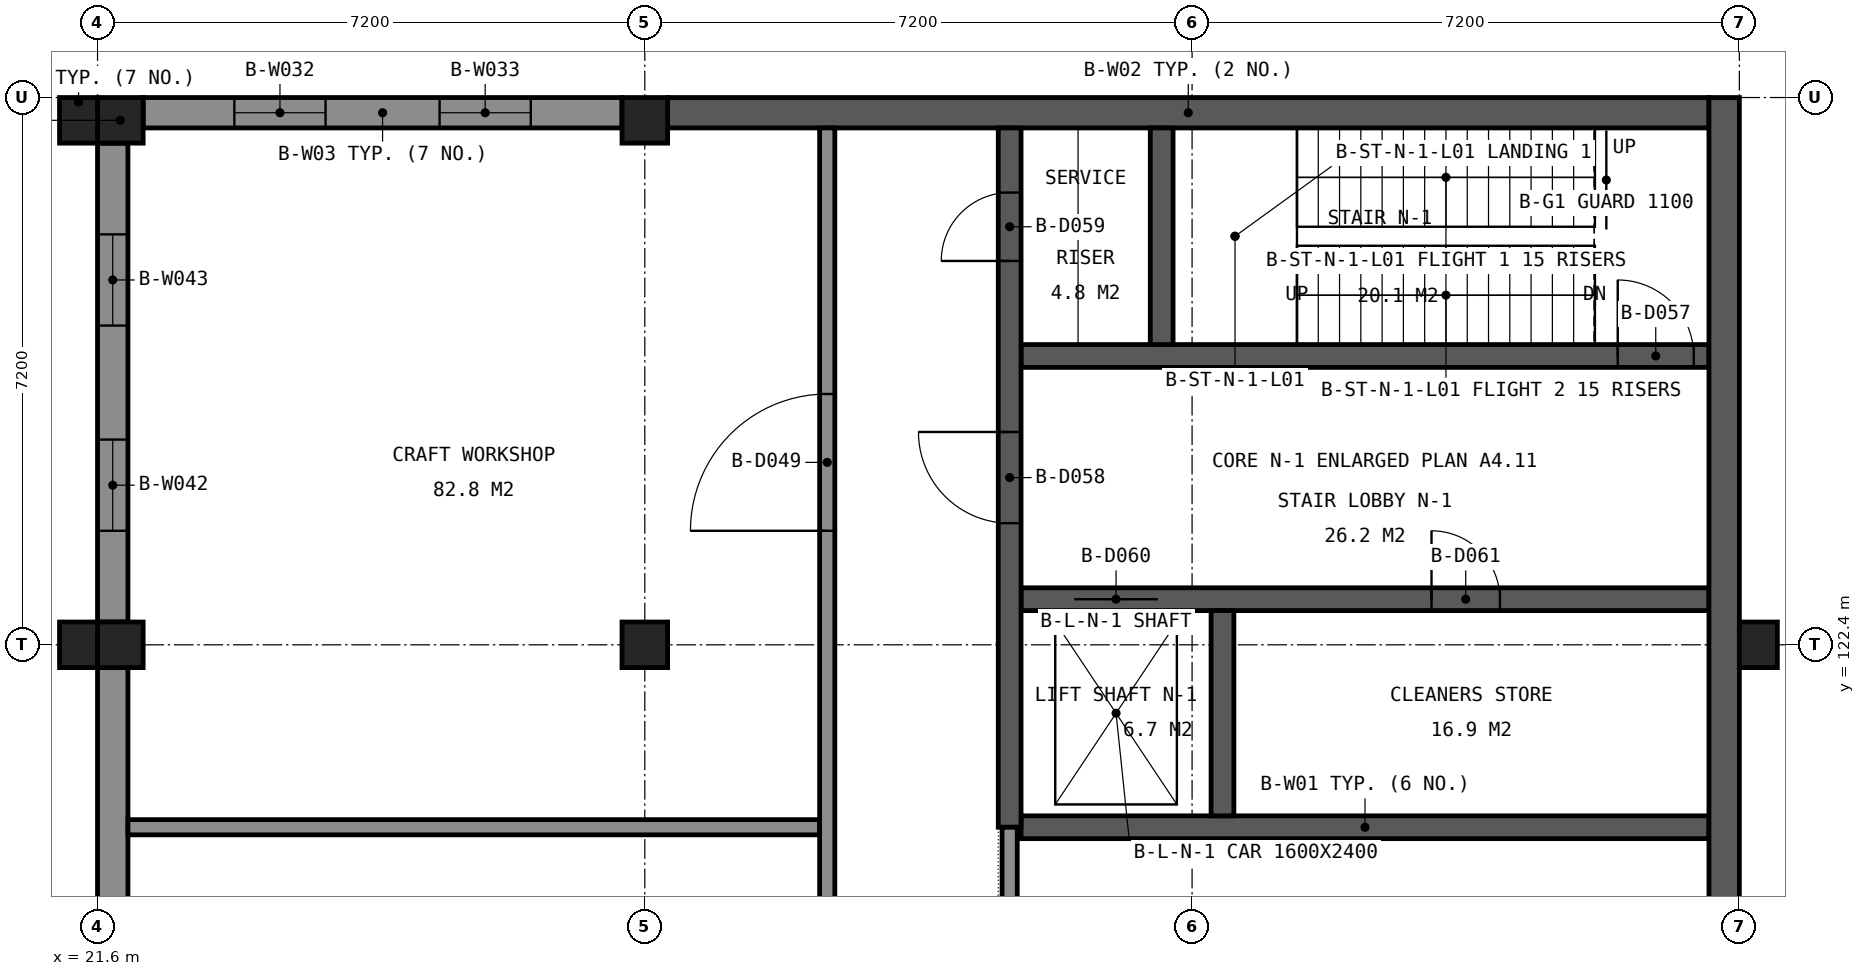
"""IFC4 building model, lengths in metres.
Left out: names, types, materials, properties, quantities, classifications, styles, units other than length and angle.
Written with IfcOpenShell. Run it as: python <this file> out.ifc"""

import sys

from ifc_helpers import new_model, si_unit, direction, frame, frame_2d, origin, origin_2d, place, context, subcontext, project, spatial, rectangle, extrude, element, fill, save


model = new_model("IFC4")
c1 = context("Model", 3, precision=1e-05, world=origin(), true_north=direction((0.0, 1.0)))
c2 = subcontext(c1, "Body", "Model", "MODEL_VIEW")
j1 = project(units=[si_unit("LENGTHUNIT", "METRE"), si_unit("PLANEANGLEUNIT", "RADIAN")], contexts=[c1])
p1 = place(None, origin())
s1 = spatial("IfcSite", under=j1, at=p1, CompositionType="ELEMENT")
p2 = place(p1, origin())
s2 = spatial("IfcBuilding", under=s1, at=p2, CompositionType="ELEMENT")
p3 = place(p2, frame((0.0, 0.0, 9.6)))
s3 = spatial("IfcBuildingStorey", under=s2, at=p3, CompositionType="ELEMENT", Elevation=9.6)
for number, where, z_axis, x_axis in (
    (1, (21.9, 129.3, 0.0), (0.0, 0.0, 1.0), (1.0, 0.0, 0.0)),
    (2, (21.9, 122.4, 0.0), (0.0, 0.0, 1.0), (1.0, 0.0, 0.0)),
    (3, (28.8, 129.3, 0.0), (0.0, 0.0, 1.0), (1.0, 0.0, 0.0)),
    (4, (28.8, 122.4, 0.0), (0.0, 0.0, 1.0), (1.0, 0.0, 0.0)),
):
    element("IfcColumn", number, at=place(p3, frame(where, z_axis=z_axis, x_axis=x_axis)), inside=s3, PredefinedType="COLUMN", context=c2, shape_type="SweptSolid", body=[
        extrude(rectangle(XDim=0.6, YDim=0.6, at=origin_2d()), origin(), (0.0, 0.0, 1.0), 4.8),
    ])
p4 = place(p3, frame((33.75, 120.0, 0.0), z_axis=(0.0, 0.0, 1.0), x_axis=(1.0, 0.0, 0.0)))
e5 = element("IfcWall", 5, at=p4, inside=s3, PredefinedType="SHEAR", context=c2, shape_type="SweptSolid", body=[
    extrude(rectangle(XDim=9.05, YDim=0.3, at=frame_2d((4.525, 0.0))), origin(), (0.0, 0.0, 1.0), 4.55),
])
p5 = place(p3, frame((33.75, 123.0, 0.0), z_axis=(0.0, 0.0, 1.0), x_axis=(1.0, 0.0, 0.0)))
e6 = element("IfcWall", 6, at=p5, inside=s3, PredefinedType="SHEAR", context=c2, shape_type="SweptSolid", body=[
    extrude(rectangle(XDim=9.05, YDim=0.3, at=frame_2d((4.525, 0.0))), origin(), (0.0, 0.0, 1.0), 4.55),
])
p6 = place(p5, frame((0.7, 0.0, 0.0)))
e7 = element("IfcOpeningElement", 7, at=p6, cuts=e6, PredefinedType="OPENING", context=c2, shape_type="SweptSolid", body=[
    extrude(rectangle(XDim=1.1, YDim=2.1, at=frame_2d((0.55, 1.05))), frame((0.0, 0.16, 0.0), z_axis=(0.0, -1.0, 0.0), x_axis=(1.0, 0.0, 0.0)), (0.0, 0.0, 1.0), 0.32),
])
p7 = place(p5, frame((5.4, 0.0, 0.0)))
e8 = element("IfcOpeningElement", 8, at=p7, cuts=e6, PredefinedType="OPENING", context=c2, shape_type="SweptSolid", body=[
    extrude(rectangle(XDim=0.9, YDim=2.1, at=frame_2d((0.45, 1.05))), frame((0.0, 0.16, 0.0), z_axis=(0.0, -1.0, 0.0), x_axis=(1.0, 0.0, 0.0)), (0.0, 0.0, 1.0), 0.32),
])
p8 = place(p3, frame((33.75, 126.2, 0.0), z_axis=(0.0, 0.0, 1.0), x_axis=(1.0, 0.0, 0.0)))
e9 = element("IfcWall", 9, at=p8, inside=s3, PredefinedType="SHEAR", context=c2, shape_type="SweptSolid", body=[
    extrude(rectangle(XDim=9.05, YDim=0.3, at=frame_2d((4.525, 0.0))), origin(), (0.0, 0.0, 1.0), 4.55),
])
p9 = place(p8, frame((7.85, 0.0, 0.0)))
e10 = element("IfcOpeningElement", 10, at=p9, cuts=e9, PredefinedType="OPENING", context=c2, shape_type="SweptSolid", body=[
    extrude(rectangle(XDim=1.0, YDim=2.1, at=frame_2d((0.5, 1.05))), frame((0.0, 0.16, 0.0), z_axis=(0.0, -1.0, 0.0), x_axis=(1.0, 0.0, 0.0)), (0.0, 0.0, 1.0), 0.32),
])
p10 = place(p3, frame((29.1, 129.4, 0.0), z_axis=(0.0, 0.0, 1.0), x_axis=(1.0, 0.0, 0.0)))
e11 = element("IfcWall", 11, at=p10, inside=s3, PredefinedType="SHEAR", context=c2, shape_type="SweptSolid", body=[
    extrude(rectangle(XDim=13.7, YDim=0.4, at=frame_2d((6.85, 0.0))), origin(), (0.0, 0.0, 1.0), 4.55),
])
p11 = place(p3, frame((33.6, 120.0, 0.0), z_axis=(0.0, 0.0, 1.0), x_axis=(0.0, 1.0, 0.0)))
e12 = element("IfcWall", 12, at=p11, inside=s3, PredefinedType="SHEAR", context=c2, shape_type="SweptSolid", body=[
    extrude(rectangle(XDim=9.2, YDim=0.3, at=frame_2d((4.6, 0.0))), origin(), (0.0, 0.0, 1.0), 4.55),
])
p12 = place(p11, frame((4.0, 0.0, 0.0)))
e13 = element("IfcOpeningElement", 13, at=p12, cuts=e12, PredefinedType="OPENING", context=c2, shape_type="SweptSolid", body=[
    extrude(rectangle(XDim=1.2, YDim=2.1, at=frame_2d((0.6, 1.05))), frame((0.0, 0.16, 0.0), z_axis=(0.0, -1.0, 0.0), x_axis=(1.0, 0.0, 0.0)), (0.0, 0.0, 1.0), 0.32),
])
p13 = place(p11, frame((7.45, 0.0, 0.0)))
e14 = element("IfcOpeningElement", 14, at=p13, cuts=e12, PredefinedType="OPENING", context=c2, shape_type="SweptSolid", body=[
    extrude(rectangle(XDim=0.9, YDim=2.1, at=frame_2d((0.45, 1.05))), frame((0.0, 0.16, 0.0), z_axis=(0.0, -1.0, 0.0), x_axis=(1.0, 0.0, 0.0)), (0.0, 0.0, 1.0), 0.32),
])
p14 = place(p3, frame((35.6, 126.35, 0.0), z_axis=(0.0, 0.0, 1.0), x_axis=(0.0, 1.0, 0.0)))
e15 = element("IfcWall", 15, at=p14, inside=s3, PredefinedType="SHEAR", context=c2, shape_type="SweptSolid", body=[
    extrude(rectangle(XDim=2.85, YDim=0.3, at=frame_2d((1.425, 0.0))), origin(), (0.0, 0.0, 1.0), 4.55),
])
p15 = place(p3, frame((36.4, 120.15, 0.0), z_axis=(0.0, 0.0, 1.0), x_axis=(0.0, 1.0, 0.0)))
e16 = element("IfcWall", 16, at=p15, inside=s3, PredefinedType="SHEAR", context=c2, shape_type="SweptSolid", body=[
    extrude(rectangle(XDim=2.7, YDim=0.3, at=frame_2d((1.35, 0.0))), origin(), (0.0, 0.0, 1.0), 4.55),
])
p16 = place(p3, frame((43.0, 115.5, 0.0), z_axis=(0.0, 0.0, 1.0), x_axis=(0.0, 1.0, 0.0)))
e17 = element("IfcWall", 17, at=p16, inside=s3, PredefinedType="SHEAR", context=c2, shape_type="SweptSolid", body=[
    extrude(rectangle(XDim=14.1, YDim=0.4, at=frame_2d((7.05, 0.0))), origin(), (0.0, 0.0, 1.0), 4.55),
])
p17 = place(p3, frame((22.2, 129.4, 0.0), z_axis=(0.0, 0.0, 1.0), x_axis=(1.0, 0.0, 0.0)))
e18 = element("IfcWall", 18, at=p17, inside=s3, PredefinedType="SOLIDWALL", context=c2, shape_type="SweptSolid", body=[
    extrude(rectangle(XDim=6.3, YDim=0.4, at=frame_2d((3.15, 0.0))), origin(), (0.0, 0.0, 1.0), 3.95),
])
p18 = place(p17, frame((1.2, 0.0, 0.9)))
e19 = element("IfcOpeningElement", 19, at=p18, cuts=e18, PredefinedType="OPENING", context=c2, shape_type="SweptSolid", body=[
    extrude(rectangle(XDim=1.2, YDim=2.4, at=frame_2d((0.6, 1.2))), frame((0.0, 0.21, 0.0), z_axis=(0.0, -1.0, 0.0), x_axis=(1.0, 0.0, 0.0)), (0.0, 0.0, 1.0), 0.42),
])
p19 = place(p17, frame((3.9, 0.0, 0.9)))
e20 = element("IfcOpeningElement", 20, at=p19, cuts=e18, PredefinedType="OPENING", context=c2, shape_type="SweptSolid", body=[
    extrude(rectangle(XDim=1.2, YDim=2.4, at=frame_2d((0.6, 1.2))), frame((0.0, 0.21, 0.0), z_axis=(0.0, -1.0, 0.0), x_axis=(1.0, 0.0, 0.0)), (0.0, 0.0, 1.0), 0.42),
])
p20 = place(p3, frame((21.8, 115.5, 0.0), z_axis=(0.0, 0.0, 1.0), x_axis=(0.0, 1.0, 0.0)))
e21 = element("IfcWall", 21, at=p20, inside=s3, PredefinedType="SOLIDWALL", context=c2, shape_type="SweptSolid", body=[
    extrude(rectangle(XDim=6.6, YDim=0.4, at=frame_2d((3.3, 0.0))), origin(), (0.0, 0.0, 1.0), 3.95),
])
p21 = place(p20, frame((1.575, 0.0, 0.9)))
e22 = element("IfcOpeningElement", 22, at=p21, cuts=e21, PredefinedType="OPENING", context=c2, shape_type="SweptSolid", body=[
    extrude(rectangle(XDim=1.2, YDim=2.4, at=frame_2d((0.6, 1.2))), frame((0.0, 0.21, 0.0), z_axis=(0.0, -1.0, 0.0), x_axis=(1.0, 0.0, 0.0)), (0.0, 0.0, 1.0), 0.42),
])
p22 = place(p3, frame((21.8, 122.7, 0.0), z_axis=(0.0, 0.0, 1.0), x_axis=(0.0, 1.0, 0.0)))
e23 = element("IfcWall", 23, at=p22, inside=s3, PredefinedType="SOLIDWALL", context=c2, shape_type="SweptSolid", body=[
    extrude(rectangle(XDim=6.3, YDim=0.4, at=frame_2d((3.15, 0.0))), origin(), (0.0, 0.0, 1.0), 3.95),
])
p23 = place(p22, frame((1.2, 0.0, 0.9)))
e24 = element("IfcOpeningElement", 24, at=p23, cuts=e23, PredefinedType="OPENING", context=c2, shape_type="SweptSolid", body=[
    extrude(rectangle(XDim=1.2, YDim=2.4, at=frame_2d((0.6, 1.2))), frame((0.0, 0.21, 0.0), z_axis=(0.0, -1.0, 0.0), x_axis=(1.0, 0.0, 0.0)), (0.0, 0.0, 1.0), 0.42),
])
p24 = place(p22, frame((3.9, 0.0, 0.9)))
e25 = element("IfcOpeningElement", 25, at=p24, cuts=e23, PredefinedType="OPENING", context=c2, shape_type="SweptSolid", body=[
    extrude(rectangle(XDim=1.2, YDim=2.4, at=frame_2d((0.6, 1.2))), frame((0.0, 0.21, 0.0), z_axis=(0.0, -1.0, 0.0), x_axis=(1.0, 0.0, 0.0)), (0.0, 0.0, 1.0), 0.42),
])
for number, where, z_axis, x_axis in (
    (26, (21.35, 122.4, 0.0), (0.0, 0.0, 1.0), (1.0, 0.0, 0.0)),
    (27, (21.35, 129.3, 0.0), (0.0, 0.0, 1.0), (1.0, 0.0, 0.0)),
):
    element("IfcColumn", number, at=place(p3, frame(where, z_axis=z_axis, x_axis=x_axis)), inside=s3, PredefinedType="COLUMN", context=c2, shape_type="SweptSolid", body=[
        extrude(rectangle(XDim=0.5, YDim=0.6, at=origin_2d()), origin(), (0.0, 0.0, 1.0), 4.8),
    ])
p25 = place(p3, frame((21.525, 115.5, -0.15), z_axis=(0.0, 0.0, 1.0), x_axis=(0.0, 1.0, 0.0)))
e28 = element("IfcWall", 28, at=p25, inside=s3, PredefinedType="SOLIDWALL", context=c2, shape_type="SweptSolid", body=[
    extrude(rectangle(XDim=6.6, YDim=0.15, at=frame_2d((3.3, 0.0))), origin(), (0.0, 0.0, 1.0), 0.3),
])
p26 = place(p3, frame((21.525, 122.7, -0.15), z_axis=(0.0, 0.0, 1.0), x_axis=(0.0, 1.0, 0.0)))
e29 = element("IfcWall", 29, at=p26, inside=s3, PredefinedType="SOLIDWALL", context=c2, shape_type="SweptSolid", body=[
    extrude(rectangle(XDim=6.3, YDim=0.15, at=frame_2d((3.15, 0.0))), origin(), (0.0, 0.0, 1.0), 0.3),
])
p27 = place(p3, frame((43.45, 122.4, 0.0), z_axis=(0.0, 0.0, 1.0), x_axis=(1.0, 0.0, 0.0)))
e30 = element("IfcColumn", 30, at=p27, inside=s3, PredefinedType="COLUMN", context=c2, shape_type="SweptSolid", body=[
    extrude(rectangle(XDim=0.5, YDim=0.6, at=origin_2d()), origin(), (0.0, 0.0, 1.0), 4.8),
])
p28 = place(p3, frame((43.275, 115.5, -0.15), z_axis=(0.0, 0.0, 1.0), x_axis=(0.0, 1.0, 0.0)))
e31 = element("IfcWall", 31, at=p28, inside=s3, PredefinedType="SOLIDWALL", context=c2, shape_type="SweptSolid", body=[
    extrude(rectangle(XDim=6.6, YDim=0.15, at=frame_2d((3.3, 0.0))), origin(), (0.0, 0.0, 1.0), 0.3),
])
p29 = place(p3, frame((43.275, 122.7, -0.15), z_axis=(0.0, 0.0, 1.0), x_axis=(0.0, 1.0, 0.0)))
e32 = element("IfcWall", 32, at=p29, inside=s3, PredefinedType="SOLIDWALL", context=c2, shape_type="SweptSolid", body=[
    extrude(rectangle(XDim=6.9, YDim=0.15, at=frame_2d((3.45, 0.0))), origin(), (0.0, 0.0, 1.0), 0.3),
])
p30 = place(p3, frame((22.0, 120.0, 0.0), z_axis=(0.0, 0.0, 1.0), x_axis=(1.0, 0.0, 0.0)))
e33 = element("IfcWall", 33, at=p30, inside=s3, PredefinedType="PARTITIONING", context=c2, shape_type="SweptSolid", body=[
    extrude(rectangle(XDim=9.1, YDim=0.2, at=frame_2d((4.55, 0.0))), origin(), (0.0, 0.0, 1.0), 3.95),
])
p31 = place(p3, frame((31.2, 86.8, 0.0), z_axis=(0.0, 0.0, 1.0), x_axis=(0.0, 1.0, 0.0)))
e34 = element("IfcWall", 34, at=p31, inside=s3, PredefinedType="PARTITIONING", context=c2, shape_type="SweptSolid", body=[
    extrude(rectangle(XDim=42.4, YDim=0.2, at=frame_2d((21.2, 0.0))), origin(), (0.0, 0.0, 1.0), 3.95),
])
p32 = place(p31, frame((37.1, 0.0, 0.0)))
e35 = element("IfcOpeningElement", 35, at=p32, cuts=e34, PredefinedType="OPENING", context=c2, shape_type="SweptSolid", body=[
    extrude(rectangle(XDim=1.8, YDim=2.1, at=frame_2d((0.9, 1.05))), frame((0.0, 0.11, 0.0), z_axis=(0.0, -1.0, 0.0), x_axis=(1.0, 0.0, 0.0)), (0.0, 0.0, 1.0), 0.22),
])
p33 = place(p31, frame((27.5, 0.0, 0.0)))
e36 = element("IfcOpeningElement", 36, at=p33, cuts=e34, PredefinedType="OPENING", context=c2, shape_type="SweptSolid", body=[
    extrude(rectangle(XDim=1.8, YDim=2.1, at=frame_2d((0.9, 1.05))), frame((0.0, 0.11, 0.0), z_axis=(0.0, -1.0, 0.0), x_axis=(1.0, 0.0, 0.0)), (0.0, 0.0, 1.0), 0.22),
])
p34 = place(p31, frame((17.9, 0.0, 0.0)))
e37 = element("IfcOpeningElement", 37, at=p34, cuts=e34, PredefinedType="OPENING", context=c2, shape_type="SweptSolid", body=[
    extrude(rectangle(XDim=1.8, YDim=2.1, at=frame_2d((0.9, 1.05))), frame((0.0, 0.11, 0.0), z_axis=(0.0, -1.0, 0.0), x_axis=(1.0, 0.0, 0.0)), (0.0, 0.0, 1.0), 0.22),
])
p35 = place(p31, frame((9.9, 0.0, 0.0)))
e38 = element("IfcOpeningElement", 38, at=p35, cuts=e34, PredefinedType="OPENING", context=c2, shape_type="SweptSolid", body=[
    extrude(rectangle(XDim=1.0, YDim=2.1, at=frame_2d((0.5, 1.05))), frame((0.0, 0.11, 0.0), z_axis=(0.0, -1.0, 0.0), x_axis=(1.0, 0.0, 0.0)), (0.0, 0.0, 1.0), 0.22),
])
p36 = place(p31, frame((2.7, 0.0, 0.0)))
e39 = element("IfcOpeningElement", 39, at=p36, cuts=e34, PredefinedType="OPENING", context=c2, shape_type="SweptSolid", body=[
    extrude(rectangle(XDim=1.0, YDim=2.1, at=frame_2d((0.5, 1.05))), frame((0.0, 0.11, 0.0), z_axis=(0.0, -1.0, 0.0), x_axis=(1.0, 0.0, 0.0)), (0.0, 0.0, 1.0), 0.22),
])
p37 = place(p3, frame((33.6, 96.0, 0.0), z_axis=(0.0, 0.0, 1.0), x_axis=(0.0, 1.0, 0.0)))
e40 = element("IfcWall", 40, at=p37, inside=s3, PredefinedType="PARTITIONING", context=c2, shape_type="SweptSolid", body=[
    extrude(rectangle(XDim=24.0, YDim=0.2, at=frame_2d((12.0, 0.0))), origin(), (0.0, 0.0, 1.0), 3.95),
])
p38 = place(p37, frame((17.1, 0.0, 0.0)))
e41 = element("IfcOpeningElement", 41, at=p38, cuts=e40, PredefinedType="OPENING", context=c2, shape_type="SweptSolid", body=[
    extrude(rectangle(XDim=1.8, YDim=2.1, at=frame_2d((0.9, 1.05))), frame((0.0, 0.11, 0.0), z_axis=(0.0, -1.0, 0.0), x_axis=(1.0, 0.0, 0.0)), (0.0, 0.0, 1.0), 0.22),
])
p39 = place(p37, frame((7.9, 0.0, 0.0)))
e42 = element("IfcOpeningElement", 42, at=p39, cuts=e40, PredefinedType="OPENING", context=c2, shape_type="SweptSolid", body=[
    extrude(rectangle(XDim=1.0, YDim=2.1, at=frame_2d((0.5, 1.05))), frame((0.0, 0.11, 0.0), z_axis=(0.0, -1.0, 0.0), x_axis=(1.0, 0.0, 0.0)), (0.0, 0.0, 1.0), 0.22),
])
p40 = place(p37, frame((1.9, 0.0, 0.0)))
e43 = element("IfcOpeningElement", 43, at=p40, cuts=e40, PredefinedType="OPENING", context=c2, shape_type="SweptSolid", body=[
    extrude(rectangle(XDim=1.0, YDim=2.1, at=frame_2d((0.5, 1.05))), frame((0.0, 0.11, 0.0), z_axis=(0.0, -1.0, 0.0), x_axis=(1.0, 0.0, 0.0)), (0.0, 0.0, 1.0), 0.22),
])
p41 = place(p18, origin())
e44 = element("IfcWindow", 44, at=p41, inside=s3, PartitioningType="SINGLE_PANEL", PredefinedType="WINDOW", context=c2, shape_type="SweptSolid", body=[
    extrude(rectangle(XDim=1.2, YDim=2.4, at=frame_2d((0.6, 1.2))), frame((0.0, 0.03, 0.0), z_axis=(0.0, -1.0, 0.0), x_axis=(1.0, 0.0, 0.0)), (0.0, 0.0, 1.0), 0.06),
])
fill(e19, e44)
p42 = place(p19, origin())
e45 = element("IfcWindow", 45, at=p42, inside=s3, PartitioningType="SINGLE_PANEL", PredefinedType="WINDOW", context=c2, shape_type="SweptSolid", body=[
    extrude(rectangle(XDim=1.2, YDim=2.4, at=frame_2d((0.6, 1.2))), frame((0.0, 0.03, 0.0), z_axis=(0.0, -1.0, 0.0), x_axis=(1.0, 0.0, 0.0)), (0.0, 0.0, 1.0), 0.06),
])
fill(e20, e45)
p43 = place(p23, origin())
e46 = element("IfcWindow", 46, at=p43, inside=s3, PartitioningType="SINGLE_PANEL", PredefinedType="WINDOW", context=c2, shape_type="SweptSolid", body=[
    extrude(rectangle(XDim=1.2, YDim=2.4, at=frame_2d((0.6, 1.2))), frame((0.0, 0.03, 0.0), z_axis=(0.0, -1.0, 0.0), x_axis=(1.0, 0.0, 0.0)), (0.0, 0.0, 1.0), 0.06),
])
fill(e24, e46)
p44 = place(p24, origin())
e47 = element("IfcWindow", 47, at=p44, inside=s3, PartitioningType="SINGLE_PANEL", PredefinedType="WINDOW", context=c2, shape_type="SweptSolid", body=[
    extrude(rectangle(XDim=1.2, YDim=2.4, at=frame_2d((0.6, 1.2))), frame((0.0, 0.03, 0.0), z_axis=(0.0, -1.0, 0.0), x_axis=(1.0, 0.0, 0.0)), (0.0, 0.0, 1.0), 0.06),
])
fill(e25, e47)
p45 = place(p32, origin())
e48 = element("IfcDoor", 48, at=p45, inside=s3, OperationType="DOUBLE_DOOR_DOUBLE_SWING", PredefinedType="DOOR", context=c2, shape_type="SweptSolid", body=[
    extrude(rectangle(XDim=1.8, YDim=2.1, at=frame_2d((0.9, 1.05))), frame((0.0, 0.025, 0.0), z_axis=(0.0, -1.0, 0.0), x_axis=(1.0, 0.0, 0.0)), (0.0, 0.0, 1.0), 0.05),
])
fill(e35, e48)
p46 = place(p9, origin())
e49 = element("IfcDoor", 49, at=p46, inside=s3, OperationType="SINGLE_SWING_LEFT", PredefinedType="DOOR", context=c2, shape_type="SweptSolid", body=[
    extrude(rectangle(XDim=1.0, YDim=2.1, at=frame_2d((0.5, 1.05))), frame((0.0, 0.025, 0.0), z_axis=(0.0, -1.0, 0.0), x_axis=(1.0, 0.0, 0.0)), (0.0, 0.0, 1.0), 0.05),
])
fill(e10, e49)
p47 = place(p12, origin())
e50 = element("IfcDoor", 50, at=p47, inside=s3, OperationType="SINGLE_SWING_RIGHT", PredefinedType="DOOR", context=c2, shape_type="SweptSolid", body=[
    extrude(rectangle(XDim=1.2, YDim=2.1, at=frame_2d((0.6, 1.05))), frame((0.0, 0.025, 0.0), z_axis=(0.0, -1.0, 0.0), x_axis=(1.0, 0.0, 0.0)), (0.0, 0.0, 1.0), 0.05),
])
fill(e13, e50)
p48 = place(p13, origin())
e51 = element("IfcDoor", 51, at=p48, inside=s3, OperationType="SINGLE_SWING_LEFT", PredefinedType="DOOR", context=c2, shape_type="SweptSolid", body=[
    extrude(rectangle(XDim=0.9, YDim=2.1, at=frame_2d((0.45, 1.05))), frame((0.0, 0.025, 0.0), z_axis=(0.0, -1.0, 0.0), x_axis=(1.0, 0.0, 0.0)), (0.0, 0.0, 1.0), 0.05),
])
fill(e14, e51)
p49 = place(p6, origin())
e52 = element("IfcDoor", 52, at=p49, inside=s3, OperationType="SLIDING_TO_LEFT", PredefinedType="DOOR", context=c2, shape_type="SweptSolid", body=[
    extrude(rectangle(XDim=1.1, YDim=2.1, at=frame_2d((0.55, 1.05))), frame((0.0, 0.025, 0.0), z_axis=(0.0, -1.0, 0.0), x_axis=(1.0, 0.0, 0.0)), (0.0, 0.0, 1.0), 0.05),
])
fill(e7, e52)
p50 = place(p7, origin())
e53 = element("IfcDoor", 53, at=p50, inside=s3, OperationType="SINGLE_SWING_LEFT", PredefinedType="DOOR", context=c2, shape_type="SweptSolid", body=[
    extrude(rectangle(XDim=0.9, YDim=2.1, at=frame_2d((0.45, 1.05))), frame((0.0, 0.025, 0.0), z_axis=(0.0, -1.0, 0.0), x_axis=(1.0, 0.0, 0.0)), (0.0, 0.0, 1.0), 0.05),
])
fill(e8, e53)
save(model, sys.argv[1])
